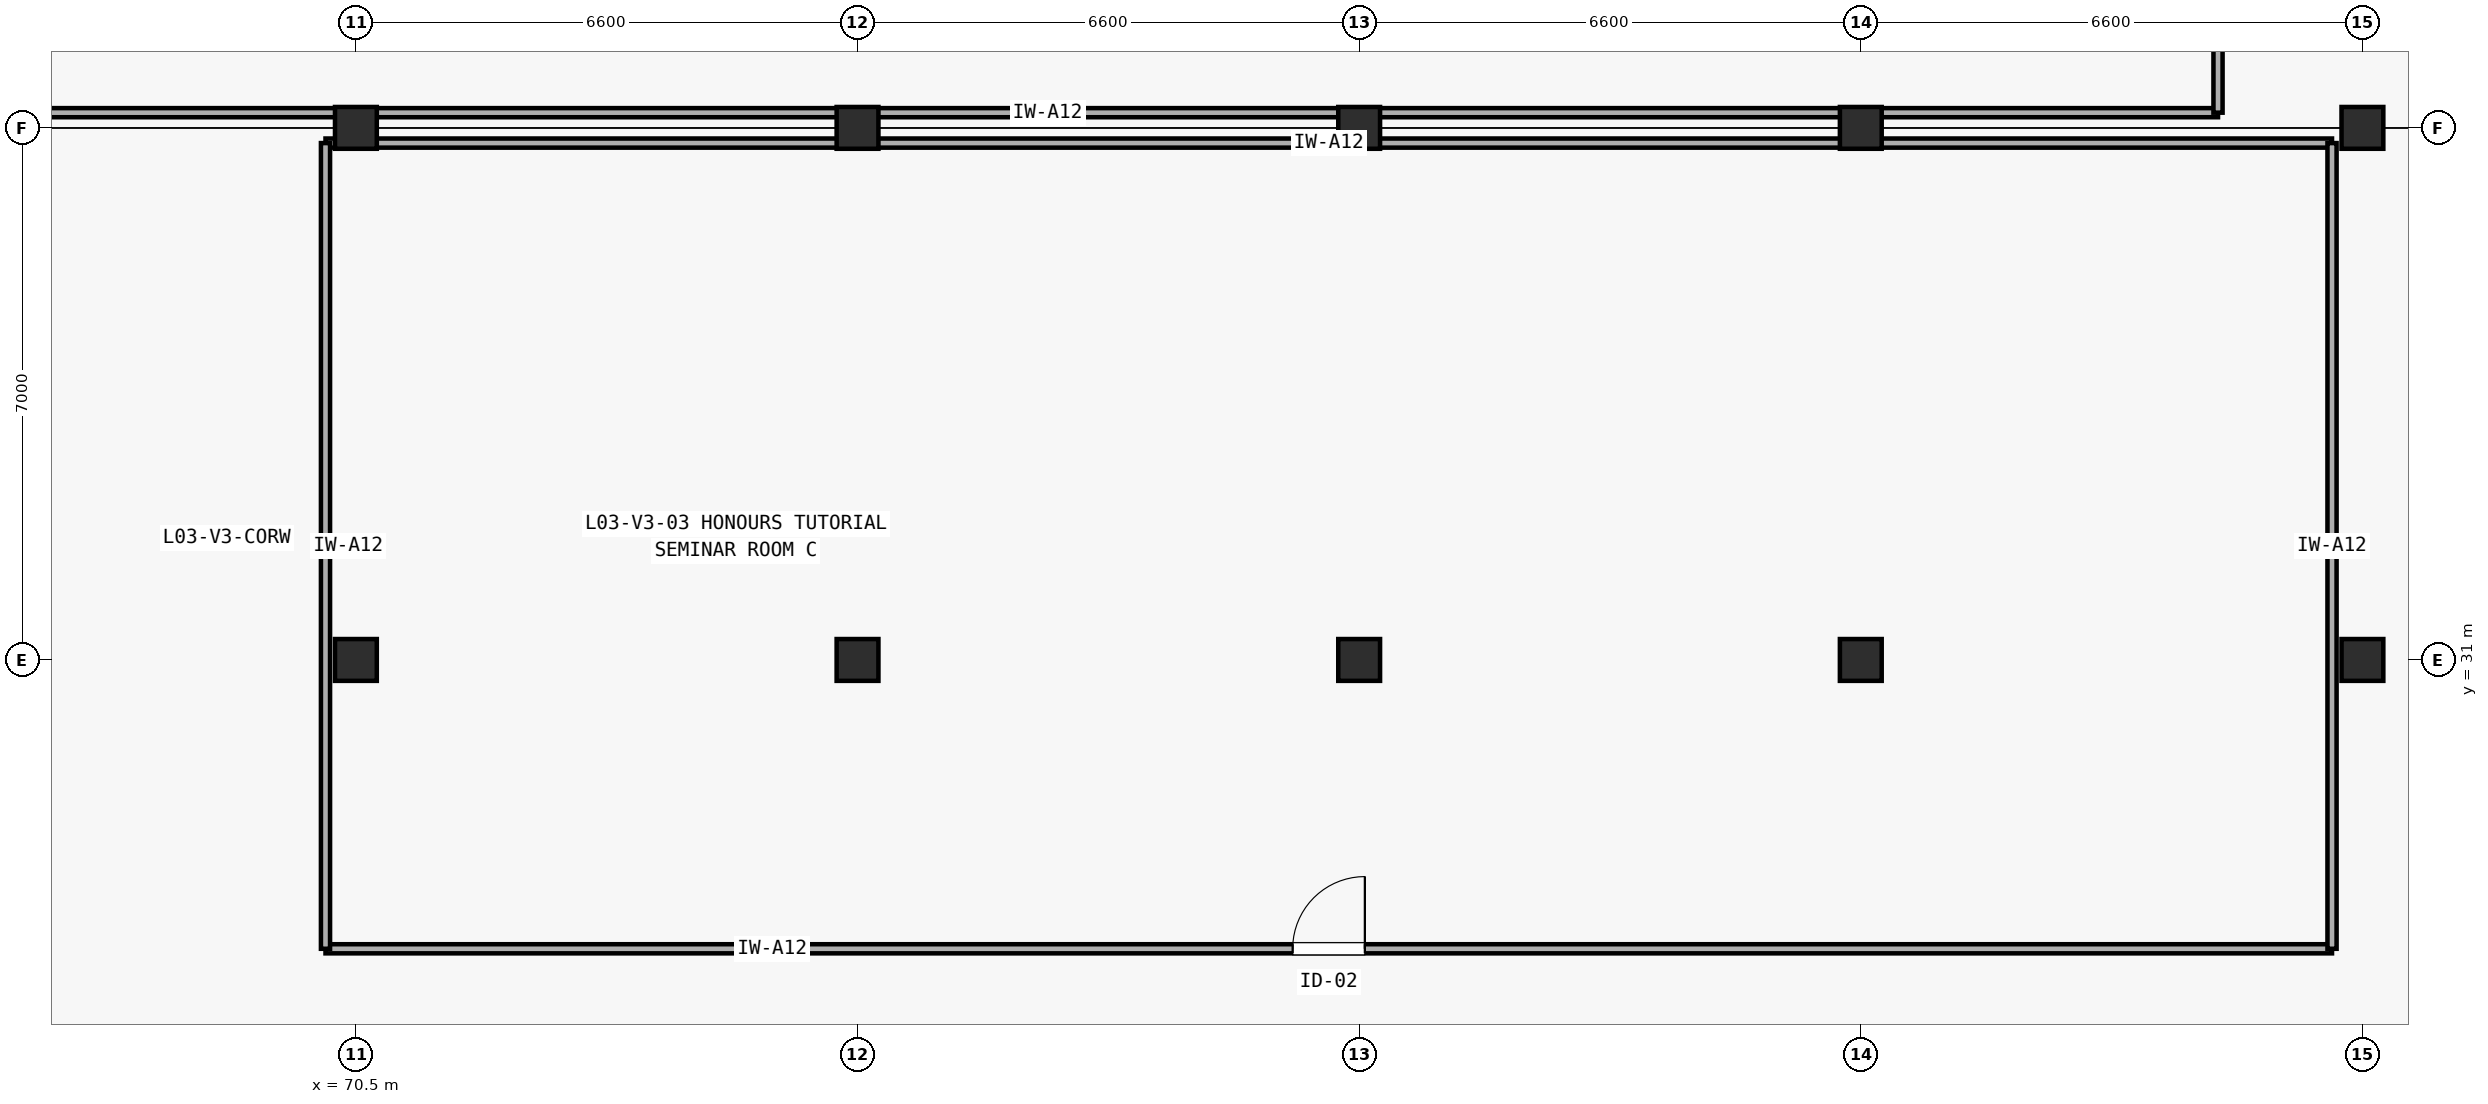
"""IFC4 building model, lengths in metres.
Left out: names, types, materials, properties, quantities, classifications, styles, units other than length and angle.
Written with IfcOpenShell. Run it as: python <this file> out.ifc"""

import sys

from ifc_helpers import new_model, si_unit, direction, frame, frame_2d, origin, origin_2d, place, context, subcontext, project, spatial, rectangle, extrude, element, fill, save


model = new_model("IFC4")
c1 = context("Model", 3, precision=1e-05, world=origin(), true_north=direction((0.0, 1.0)))
c2 = subcontext(c1, "Body", "Model", "MODEL_VIEW")
j1 = project(units=[si_unit("LENGTHUNIT", "METRE"), si_unit("PLANEANGLEUNIT", "RADIAN")], contexts=[c1])
p1 = place(None, origin())
s1 = spatial("IfcSite", under=j1, at=p1, CompositionType="ELEMENT")
p2 = place(p1, origin())
s2 = spatial("IfcBuilding", under=s1, at=p2, CompositionType="ELEMENT")
p3 = place(p2, frame((0.0, 0.0, 12.6)))
s3 = spatial("IfcBuildingStorey", under=s2, at=p3, CompositionType="ELEMENT", Elevation=12.6)
for number, where, z_axis, x_axis in (
    (1, (70.5, 31.0, 0.0), (0.0, 0.0, 1.0), (1.0, 0.0, 0.0)),
    (2, (70.5, 38.0, 0.0), (0.0, 0.0, 1.0), (1.0, 0.0, 0.0)),
    (3, (77.1, 31.0, 0.0), (0.0, 0.0, 1.0), (1.0, 0.0, 0.0)),
    (4, (77.1, 38.0, 0.0), (0.0, 0.0, 1.0), (1.0, 0.0, 0.0)),
    (5, (83.7, 31.0, 0.0), (0.0, 0.0, 1.0), (1.0, 0.0, 0.0)),
    (6, (83.7, 38.0, 0.0), (0.0, 0.0, 1.0), (1.0, 0.0, 0.0)),
    (7, (90.3, 31.0, 0.0), (0.0, 0.0, 1.0), (1.0, 0.0, 0.0)),
    (8, (90.3, 38.0, 0.0), (0.0, 0.0, 1.0), (1.0, 0.0, 0.0)),
    (9, (96.9, 31.0, 0.0), (0.0, 0.0, 1.0), (1.0, 0.0, 0.0)),
    (10, (96.9, 38.0, 0.0), (0.0, 0.0, 1.0), (1.0, 0.0, 0.0)),
):
    element("IfcColumn", number, at=place(p3, frame(where, z_axis=z_axis, x_axis=x_axis)), inside=s3, PredefinedType="COLUMN", context=c2, shape_type="SweptSolid", body=[
        extrude(rectangle(XDim=0.55, YDim=0.55, at=origin_2d()), origin(), (0.0, 0.0, 1.0), 4.2),
    ])
p4 = place(p3, frame((70.1, 27.2, 0.0), z_axis=(0.0, 0.0, 1.0), x_axis=(1.0, 0.0, 0.0)))
e11 = element("IfcWall", 11, at=p4, inside=s3, PredefinedType="PARTITIONING", context=c2, shape_type="SweptSolid", body=[
    extrude(rectangle(XDim=26.4, YDim=0.12, at=frame_2d((13.2, 0.0))), origin(), (0.0, 0.0, 1.0), 3.9),
])
p5 = place(p4, frame((12.725, 0.0, 0.0)))
e12 = element("IfcOpeningElement", 12, at=p5, cuts=e11, PredefinedType="OPENING", context=c2, shape_type="SweptSolid", body=[
    extrude(rectangle(XDim=0.95, YDim=2.1, at=frame_2d((0.475, 1.05))), frame((0.0, 0.07, 0.0), z_axis=(0.0, -1.0, 0.0), x_axis=(1.0, 0.0, 0.0)), (0.0, 0.0, 1.0), 0.14),
])
p6 = place(p3, frame((70.1, 37.8, 0.0), z_axis=(0.0, 0.0, 1.0), x_axis=(1.0, 0.0, 0.0)))
e13 = element("IfcWall", 13, at=p6, inside=s3, PredefinedType="PARTITIONING", context=c2, shape_type="SweptSolid", body=[
    extrude(rectangle(XDim=26.4, YDim=0.12, at=frame_2d((13.2, 0.0))), origin(), (0.0, 0.0, 1.0), 3.405),
])
for number, where, z_axis, x_axis in (
    (14, (70.1, 27.2, 0.0), (0.0, 0.0, 1.0), (0.0, 1.0, 0.0)),
    (15, (96.5, 27.2, 0.0), (0.0, 0.0, 1.0), (0.0, 1.0, 0.0)),
):
    element("IfcWall", number, at=place(p3, frame(where, z_axis=z_axis, x_axis=x_axis)), inside=s3, PredefinedType="PARTITIONING", context=c2, shape_type="SweptSolid", body=[
        extrude(rectangle(XDim=10.6, YDim=0.12, at=frame_2d((5.3, 0.0))), origin(), (0.0, 0.0, 1.0), 3.9),
    ])
p7 = place(p3, frame((64.2, 38.2, 0.0), z_axis=(0.0, 0.0, 1.0), x_axis=(1.0, 0.0, 0.0)))
e16 = element("IfcWall", 16, at=p7, inside=s3, PredefinedType="PARTITIONING", context=c2, shape_type="SweptSolid", body=[
    extrude(rectangle(XDim=30.8, YDim=0.12, at=frame_2d((15.4, 0.0))), origin(), (0.0, 0.0, 1.0), 3.405),
])
p8 = place(p3, frame((95.0, 38.2, 0.0), z_axis=(0.0, 0.0, 1.0), x_axis=(0.0, 1.0, 0.0)))
e17 = element("IfcWall", 17, at=p8, inside=s3, PredefinedType="PARTITIONING", context=c2, shape_type="SweptSolid", body=[
    extrude(rectangle(XDim=11.1, YDim=0.12, at=frame_2d((5.55, 0.0))), origin(), (0.0, 0.0, 1.0), 3.9),
])
p9 = place(p5, origin())
e18 = element("IfcDoor", 18, at=p9, inside=s3, OperationType="SINGLE_SWING_RIGHT", PredefinedType="DOOR", context=c2, shape_type="SweptSolid", body=[
    extrude(rectangle(XDim=0.95, YDim=2.1, at=frame_2d((0.475, 1.05))), frame((0.0, 0.025, 0.0), z_axis=(0.0, -1.0, 0.0), x_axis=(1.0, 0.0, 0.0)), (0.0, 0.0, 1.0), 0.05),
])
fill(e12, e18)
save(model, sys.argv[1])
